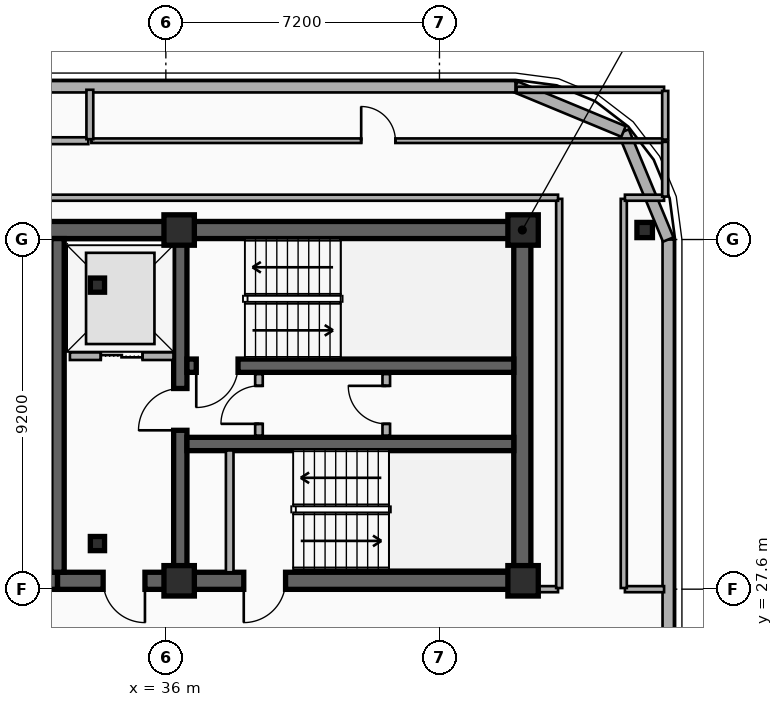
"""IFC4 building model, lengths in metres.
Left out: names, types, materials, properties, quantities, classifications, styles, units other than length and angle.
Written with IfcOpenShell. Run it as: python <this file> out.ifc"""

import sys

from ifc_helpers import new_model, si_unit, direction, frame, frame_2d, origin, origin_2d, place, context, subcontext, project, spatial, rectangle, i_section, extrude, element, fill, save


model = new_model("IFC4")
c1 = context("Model", 3, precision=1e-05, world=origin(), true_north=direction((0.0, 1.0)))
c2 = subcontext(c1, "Body", "Model", "MODEL_VIEW")
j1 = project(units=[si_unit("LENGTHUNIT", "METRE"), si_unit("PLANEANGLEUNIT", "RADIAN")], contexts=[c1])
p1 = place(None, origin())
s1 = spatial("IfcSite", under=j1, at=p1, CompositionType="ELEMENT")
p2 = place(p1, origin())
s2 = spatial("IfcBuilding", under=s1, at=p2, CompositionType="ELEMENT")
p3 = place(p2, frame((0.0, 0.0, 273.2)))
s3 = spatial("IfcBuildingStorey", under=s2, at=p3, CompositionType="ELEMENT", Elevation=273.2)
p4 = place(p3, frame((12.15, 37.05, 0.0), z_axis=(0.0, 0.0, 1.0), x_axis=(1.0, 0.0, 0.0)))
e1 = element("IfcWall", 1, at=p4, inside=s3, PredefinedType="SHEAR", context=c2, shape_type="SweptSolid", body=[
    extrude(rectangle(XDim=33.23, YDim=0.45, at=frame_2d((16.615, 0.0))), origin(), (0.0, 0.0, 1.0), 3.7),
])
p5 = place(p3, frame((33.15, 27.82, 0.0), z_axis=(0.0, 0.0, 1.0), x_axis=(-1.0, 0.0, 0.0)))
e2 = element("IfcWall", 2, at=p5, inside=s3, PredefinedType="SHEAR", context=c2, shape_type="SweptSolid", body=[
    extrude(rectangle(XDim=11.97, YDim=0.45, at=frame_2d((5.985, 0.0))), origin(), (0.0, 0.0, 1.0), 3.7),
])
p6 = place(p5, frame((6.1, 0.0, 0.0)))
e3 = element("IfcOpeningElement", 3, at=p6, cuts=e2, PredefinedType="OPENING", context=c2, shape_type="SweptSolid", body=[
    extrude(rectangle(XDim=1.6, YDim=2.2, at=frame_2d((0.8, 1.1))), frame((0.0, 0.235, 0.0), z_axis=(0.0, -1.0, 0.0), x_axis=(1.0, 0.0, 0.0)), (0.0, 0.0, 1.0), 0.47),
])
p7 = place(p3, frame((45.38, 27.82, 0.0), z_axis=(0.0, 0.0, 1.0), x_axis=(-1.0, 0.0, 0.0)))
e4 = element("IfcWall", 4, at=p7, inside=s3, PredefinedType="SHEAR", context=c2, shape_type="SweptSolid", body=[
    extrude(rectangle(XDim=12.23, YDim=0.45, at=frame_2d((6.115, 0.0))), origin(), (0.0, 0.0, 1.0), 3.7),
])
p8 = place(p7, frame((9.93, 0.0, 0.0)))
e5 = element("IfcOpeningElement", 5, at=p8, cuts=e4, PredefinedType="OPENING", context=c2, shape_type="SweptSolid", body=[
    extrude(rectangle(XDim=1.1, YDim=2.15, at=frame_2d((0.55, 1.075))), frame((0.0, 0.235, 0.0), z_axis=(0.0, -1.0, 0.0), x_axis=(1.0, 0.0, 0.0)), (0.0, 0.0, 1.0), 0.47),
])
p9 = place(p7, frame((6.23, 0.0, 0.0)))
e6 = element("IfcOpeningElement", 6, at=p9, cuts=e4, PredefinedType="OPENING", context=c2, shape_type="SweptSolid", body=[
    extrude(rectangle(XDim=1.1, YDim=2.15, at=frame_2d((0.55, 1.075))), frame((0.0, 0.235, 0.0), z_axis=(0.0, -1.0, 0.0), x_axis=(1.0, 0.0, 0.0)), (0.0, 0.0, 1.0), 0.47),
])
p10 = place(p3, frame((45.38, 28.045, 0.0), z_axis=(0.0, 0.0, 1.0), x_axis=(0.0, 1.0, 0.0)))
e7 = element("IfcWall", 7, at=p10, inside=s3, PredefinedType="SHEAR", context=c2, shape_type="SweptSolid", body=[
    extrude(rectangle(XDim=8.78, YDim=0.45, at=frame_2d((4.39, 0.0))), origin(), (0.0, 0.0, 1.0), 3.7),
])
p11 = place(p3, frame((33.15, 28.045, 0.0), z_axis=(0.0, 0.0, 1.0), x_axis=(0.0, 1.0, 0.0)))
e8 = element("IfcWall", 8, at=p11, inside=s3, PredefinedType="SHEAR", context=c2, shape_type="SweptSolid", body=[
    extrude(rectangle(XDim=8.78, YDim=0.35, at=frame_2d((4.39, 0.0))), origin(), (0.0, 0.0, 1.0), 3.7),
])
p12 = place(p3, frame((36.38, 28.045, 0.0), z_axis=(0.0, 0.0, 1.0), x_axis=(0.0, 1.0, 0.0)))
e9 = element("IfcWall", 9, at=p12, inside=s3, PredefinedType="SHEAR", context=c2, shape_type="SweptSolid", body=[
    extrude(rectangle(XDim=8.78, YDim=0.35, at=frame_2d((4.39, 0.0))), origin(), (0.0, 0.0, 1.0), 3.7),
])
p13 = place(p12, frame((3.735, 0.0, 0.0)))
e10 = element("IfcOpeningElement", 10, at=p13, cuts=e9, PredefinedType="OPENING", context=c2, shape_type="SweptSolid", body=[
    extrude(rectangle(XDim=1.1, YDim=2.15, at=frame_2d((0.55, 1.075))), frame((0.0, 0.185, 0.0), z_axis=(0.0, -1.0, 0.0), x_axis=(1.0, 0.0, 0.0)), (0.0, 0.0, 1.0), 0.37),
])
p14 = place(p3, frame((45.155, 33.48, 0.0), z_axis=(0.0, 0.0, 1.0), x_axis=(-1.0, 0.0, 0.0)))
e11 = element("IfcWall", 11, at=p14, inside=s3, PredefinedType="SHEAR", context=c2, shape_type="SweptSolid", body=[
    extrude(rectangle(XDim=8.6, YDim=0.35, at=frame_2d((4.3, 0.0))), origin(), (0.0, 0.0, 1.0), 3.7),
])
p15 = place(p14, frame((7.255, 0.0, 0.0)))
e12 = element("IfcOpeningElement", 12, at=p15, cuts=e11, PredefinedType="OPENING", context=c2, shape_type="SweptSolid", body=[
    extrude(rectangle(XDim=1.1, YDim=2.15, at=frame_2d((0.55, 1.075))), frame((0.0, 0.185, 0.0), z_axis=(0.0, -1.0, 0.0), x_axis=(1.0, 0.0, 0.0)), (0.0, 0.0, 1.0), 0.37),
])
p16 = place(p3, frame((36.555, 31.42, 0.0), z_axis=(0.0, 0.0, 1.0), x_axis=(1.0, 0.0, 0.0)))
e13 = element("IfcWall", 13, at=p16, inside=s3, PredefinedType="SHEAR", context=c2, shape_type="SweptSolid", body=[
    extrude(rectangle(XDim=8.6, YDim=0.35, at=frame_2d((4.3, 0.0))), origin(), (0.0, 0.0, 1.0), 3.7),
])
for number, where, z_axis, x_axis in (
    (14, (34.2, 28.8, 0.0), (0.0, 0.0, 1.0), (1.0, 0.0, 0.0)),
    (15, (34.2, 35.6, 0.0), (0.0, 0.0, 1.0), (1.0, 0.0, 0.0)),
):
    element("IfcColumn", number, at=place(p3, frame(where, z_axis=z_axis, x_axis=x_axis)), inside=s3, PredefinedType="COLUMN", context=c2, shape_type="SweptSolid", body=[
        extrude(i_section(OverallWidth=0.374, OverallDepth=0.372, WebThickness=0.017, FlangeThickness=0.027, FilletRadius=0.015, at=origin_2d()), origin(), (0.0, 0.0, 1.0), 3.7),
    ])
for number, where, z_axis, x_axis in (
    (16, (36.35, 27.82, 0.0), (0.0, 0.0, 1.0), (1.0, 0.0, 0.0)),
    (17, (36.35, 37.05, 0.0), (0.0, 0.0, 1.0), (1.0, 0.0, 0.0)),
    (18, (45.4, 27.82, 0.0), (0.0, 0.0, 1.0), (1.0, 0.0, 0.0)),
    (19, (45.4, 37.05, 0.0), (0.0, 0.0, 1.0), (1.0, 0.0, 0.0)),
):
    element("IfcColumn", number, at=place(p3, frame(where, z_axis=z_axis, x_axis=x_axis)), inside=s3, PredefinedType="COLUMN", context=c2, shape_type="SweptSolid", body=[
        extrude(rectangle(XDim=0.8, YDim=0.8, at=origin_2d()), origin(), (0.0, 0.0, 1.0), 3.7),
    ])
p17 = place(p3, frame((48.6, 37.05, 0.0), z_axis=(0.0, 0.0, 1.0), x_axis=(1.0, 0.0, 0.0)))
e20 = element("IfcColumn", 20, at=p17, inside=s3, PredefinedType="COLUMN", context=c2, shape_type="SweptSolid", body=[
    extrude(i_section(OverallWidth=0.408, OverallDepth=0.4, WebThickness=0.025, FlangeThickness=0.039, FilletRadius=0.015, at=origin_2d()), origin(), (0.0, 0.0, 1.0), 3.7),
])
p18 = place(p3, frame((49.22, 36.8, 0.0), z_axis=(0.0, 0.0, 1.0), x_axis=(0.0, -1.0, 0.0)))
e21 = element("IfcWall", 21, at=p18, inside=s3, PredefinedType="SOLIDWALL", context=c2, shape_type="SweptSolid", body=[
    extrude(rectangle(XDim=34.2, YDim=0.3, at=frame_2d((17.1, 0.0))), origin(), (0.0, 0.0, 1.0), 3.42),
])
p19 = place(p18, frame((21.127, 0.0, 0.75)))
e22 = element("IfcOpeningElement", 22, at=p19, cuts=e21, PredefinedType="OPENING", context=c2, shape_type="SweptSolid", body=[
    extrude(rectangle(XDim=2.1, YDim=2.1, at=frame_2d((1.05, 1.05))), frame((0.0, 0.16, 0.0), z_axis=(0.0, -1.0, 0.0), x_axis=(1.0, 0.0, 0.0)), (0.0, 0.0, 1.0), 0.32),
])
p20 = place(p18, frame((27.503, 0.0, 0.75)))
e23 = element("IfcOpeningElement", 23, at=p20, cuts=e21, PredefinedType="OPENING", context=c2, shape_type="SweptSolid", body=[
    extrude(rectangle(XDim=2.1, YDim=2.1, at=frame_2d((1.05, 1.05))), frame((0.0, 0.16, 0.0), z_axis=(0.0, -1.0, 0.0), x_axis=(1.0, 0.0, 0.0)), (0.0, 0.0, 1.0), 0.32),
])
for number, where, z_axis, x_axis in (
    (24, (48.042, 39.643, 0.0), (0.0, 0.0, 1.0), (0.383, -0.924, 0.0)),
    (25, (45.2, 40.82, 0.0), (0.0, 0.0, 1.0), (0.924, -0.383, 0.0)),
):
    element("IfcWall", number, at=place(p3, frame(where, z_axis=z_axis, x_axis=x_axis)), inside=s3, PredefinedType="SOLIDWALL", context=c2, shape_type="SweptSolid", body=[
        extrude(rectangle(XDim=3.077, YDim=0.3, at=frame_2d((1.538, 0.0))), origin(), (0.0, 0.0, 1.0), 3.42),
    ])
p21 = place(p3, frame((12.4, 40.82, 0.0), z_axis=(0.0, 0.0, 1.0), x_axis=(1.0, 0.0, 0.0)))
e26 = element("IfcWall", 26, at=p21, inside=s3, PredefinedType="SOLIDWALL", context=c2, shape_type="SweptSolid", body=[
    extrude(rectangle(XDim=32.8, YDim=0.3, at=frame_2d((16.4, 0.0))), origin(), (0.0, 0.0, 1.0), 3.42),
])
p22 = place(p21, frame((3.38, 0.0, 0.75)))
e27 = element("IfcOpeningElement", 27, at=p22, cuts=e26, PredefinedType="OPENING", context=c2, shape_type="SweptSolid", body=[
    extrude(rectangle(XDim=2.1, YDim=2.1, at=frame_2d((1.05, 1.05))), frame((0.0, 0.16, 0.0), z_axis=(0.0, -1.0, 0.0), x_axis=(1.0, 0.0, 0.0)), (0.0, 0.0, 1.0), 0.32),
])
p23 = place(p21, frame((8.54, 0.0, 0.75)))
e28 = element("IfcOpeningElement", 28, at=p23, cuts=e26, PredefinedType="OPENING", context=c2, shape_type="SweptSolid", body=[
    extrude(rectangle(XDim=2.1, YDim=2.1, at=frame_2d((1.05, 1.05))), frame((0.0, 0.16, 0.0), z_axis=(0.0, -1.0, 0.0), x_axis=(1.0, 0.0, 0.0)), (0.0, 0.0, 1.0), 0.32),
])
p24 = place(p3, frame((33.475, 33.73, 0.0), z_axis=(0.0, 0.0, 1.0), x_axis=(1.0, 0.0, 0.0)))
e29 = element("IfcWall", 29, at=p24, inside=s3, PredefinedType="PARTITIONING", context=c2, shape_type="SweptSolid", body=[
    extrude(rectangle(XDim=2.725, YDim=0.2, at=frame_2d((1.362, 0.0))), origin(), (0.0, 0.0, 1.0), 2.49),
])
p25 = place(p24, frame((0.812, 0.0, 0.0)))
e30 = element("IfcOpeningElement", 30, at=p25, cuts=e29, PredefinedType="OPENING", context=c2, shape_type="SweptSolid", body=[
    extrude(rectangle(XDim=1.1, YDim=2.15, at=frame_2d((0.55, 1.075))), frame((0.0, 0.11, 0.0), z_axis=(0.0, -1.0, 0.0), x_axis=(1.0, 0.0, 0.0)), (0.0, 0.0, 1.0), 0.22),
])
p26 = place(p3, frame((37.68, 28.045, 0.0), z_axis=(0.0, 0.0, 1.0), x_axis=(0.0, 1.0, 0.0)))
e31 = element("IfcWall", 31, at=p26, inside=s3, PredefinedType="PARTITIONING", context=c2, shape_type="SweptSolid", body=[
    extrude(rectangle(XDim=3.205, YDim=0.2, at=frame_2d((1.603, 0.0))), origin(), (0.0, 0.0, 1.0), 2.8),
])
p27 = place(p3, frame((38.45, 31.64, 0.0), z_axis=(0.0, 0.0, 1.0), x_axis=(0.0, 1.0, 0.0)))
e32 = element("IfcWall", 32, at=p27, inside=s3, PredefinedType="PARTITIONING", context=c2, shape_type="SweptSolid", body=[
    extrude(rectangle(XDim=1.62, YDim=0.2, at=frame_2d((0.81, 0.0))), origin(), (0.0, 0.0, 1.0), 3.42),
])
p28 = place(p27, frame((0.31, 0.0, 0.0)))
e33 = element("IfcOpeningElement", 33, at=p28, cuts=e32, PredefinedType="OPENING", context=c2, shape_type="SweptSolid", body=[
    extrude(rectangle(XDim=1.0, YDim=2.15, at=frame_2d((0.5, 1.075))), frame((0.0, 0.11, 0.0), z_axis=(0.0, -1.0, 0.0), x_axis=(1.0, 0.0, 0.0)), (0.0, 0.0, 1.0), 0.22),
])
p29 = place(p3, frame((41.8, 31.64, 0.0), z_axis=(0.0, 0.0, 1.0), x_axis=(0.0, 1.0, 0.0)))
e34 = element("IfcWall", 34, at=p29, inside=s3, PredefinedType="PARTITIONING", context=c2, shape_type="SweptSolid", body=[
    extrude(rectangle(XDim=1.62, YDim=0.2, at=frame_2d((0.81, 0.0))), origin(), (0.0, 0.0, 1.0), 3.42),
])
p30 = place(p29, frame((0.31, 0.0, 0.0)))
e35 = element("IfcOpeningElement", 35, at=p30, cuts=e34, PredefinedType="OPENING", context=c2, shape_type="SweptSolid", body=[
    extrude(rectangle(XDim=1.0, YDim=2.15, at=frame_2d((0.5, 1.075))), frame((0.0, 0.11, 0.0), z_axis=(0.0, -1.0, 0.0), x_axis=(1.0, 0.0, 0.0)), (0.0, 0.0, 1.0), 0.22),
])
p31 = place(p3, frame((26.44, 39.4, 0.0), z_axis=(0.0, 0.0, 1.0), x_axis=(1.0, 0.0, 0.0)))
e36 = element("IfcWall", 36, at=p31, inside=s3, PredefinedType="PLUMBINGWALL", context=c2, shape_type="SweptSolid", body=[
    extrude(rectangle(XDim=7.52, YDim=0.18, at=frame_2d((3.76, 0.0))), origin(), (0.0, 0.0, 1.0), 3.42),
])
p32 = place(p31, frame((3.335, 0.0, 0.0)))
e37 = element("IfcOpeningElement", 37, at=p32, cuts=e36, PredefinedType="OPENING", context=c2, shape_type="SweptSolid", body=[
    extrude(rectangle(XDim=0.85, YDim=2.1, at=frame_2d((0.425, 1.05))), frame((0.0, 0.1, 0.0), z_axis=(0.0, -1.0, 0.0), x_axis=(1.0, 0.0, 0.0)), (0.0, 0.0, 1.0), 0.2),
])
p33 = place(p3, frame((34.04, 39.4, 0.0), z_axis=(0.0, 0.0, 1.0), x_axis=(1.0, 0.0, 0.0)))
e38 = element("IfcWall", 38, at=p33, inside=s3, PredefinedType="PARTITIONING", context=c2, shape_type="SweptSolid", body=[
    extrude(rectangle(XDim=15.1, YDim=0.12, at=frame_2d((7.55, 0.0))), origin(), (0.0, 0.0, 1.0), 3.42),
])
p34 = place(p33, frame((7.1, 0.0, 0.0)))
e39 = element("IfcOpeningElement", 39, at=p34, cuts=e38, PredefinedType="OPENING", context=c2, shape_type="SweptSolid", body=[
    extrude(rectangle(XDim=0.9, YDim=2.1, at=frame_2d((0.45, 1.05))), frame((0.0, 0.07, 0.0), z_axis=(0.0, -1.0, 0.0), x_axis=(1.0, 0.0, 0.0)), (0.0, 0.0, 1.0), 0.14),
])
p35 = place(p3, frame((34.0, 39.44, 0.0), z_axis=(0.0, 0.0, 1.0), x_axis=(0.0, 1.0, 0.0)))
e40 = element("IfcWall", 40, at=p35, inside=s3, PredefinedType="PLUMBINGWALL", context=c2, shape_type="SweptSolid", body=[
    extrude(rectangle(XDim=1.3, YDim=0.18, at=frame_2d((0.65, 0.0))), origin(), (0.0, 0.0, 1.0), 3.42),
])
p36 = place(p3, frame((45.41, 27.6, 0.0), z_axis=(0.0, 0.0, 1.0), x_axis=(1.0, 0.0, 0.0)))
e41 = element("IfcWall", 41, at=p36, inside=s3, PredefinedType="PARTITIONING", context=c2, shape_type="SweptSolid", body=[
    extrude(rectangle(XDim=0.91, YDim=0.16, at=frame_2d((0.455, 0.0))), origin(), (0.0, 0.0, 1.0), 2.49),
])
p37 = place(p3, frame((48.08, 27.6, 0.0), z_axis=(0.0, 0.0, 1.0), x_axis=(1.0, 0.0, 0.0)))
e42 = element("IfcWall", 42, at=p37, inside=s3, PredefinedType="PARTITIONING", context=c2, shape_type="SweptSolid", body=[
    extrude(rectangle(XDim=1.03, YDim=0.16, at=frame_2d((0.515, 0.0))), origin(), (0.0, 0.0, 1.0), 3.42),
])
for number, where, z_axis, x_axis in (
    (43, (46.35, 27.63, 0.0), (0.0, 0.0, 1.0), (0.0, 1.0, 0.0)),
    (44, (48.05, 27.63, 0.0), (0.0, 0.0, 1.0), (0.0, 1.0, 0.0)),
):
    element("IfcWall", number, at=place(p3, frame(where, z_axis=z_axis, x_axis=x_axis)), inside=s3, PredefinedType="PARTITIONING", context=c2, shape_type="SweptSolid", body=[
        extrude(rectangle(XDim=10.24, YDim=0.16, at=frame_2d((5.12, 0.0))), origin(), (0.0, 0.0, 1.0), 2.9),
    ])
p38 = place(p3, frame((11.28, 37.9, 0.0), z_axis=(0.0, 0.0, 1.0), x_axis=(1.0, 0.0, 0.0)))
e45 = element("IfcWall", 45, at=p38, inside=s3, PredefinedType="PARTITIONING", context=c2, shape_type="SweptSolid", body=[
    extrude(rectangle(XDim=35.04, YDim=0.16, at=frame_2d((17.52, 0.0))), origin(), (0.0, 0.0, 1.0), 3.42),
])
p39 = place(p3, frame((48.08, 37.9, 0.0), z_axis=(0.0, 0.0, 1.0), x_axis=(1.0, 0.0, 0.0)))
e46 = element("IfcWall", 46, at=p39, inside=s3, PredefinedType="PARTITIONING", context=c2, shape_type="SweptSolid", body=[
    extrude(rectangle(XDim=1.03, YDim=0.16, at=frame_2d((0.515, 0.0))), origin(), (0.0, 0.0, 1.0), 3.42),
])
p40 = place(p3, frame((49.14, 37.93, 0.0), z_axis=(0.0, 0.0, 1.0), x_axis=(0.0, 1.0, 0.0)))
e47 = element("IfcWall", 47, at=p40, inside=s3, PredefinedType="PARTITIONING", context=c2, shape_type="SweptSolid", body=[
    extrude(rectangle(XDim=1.44, YDim=0.16, at=frame_2d((0.72, 0.0))), origin(), (0.0, 0.0, 1.0), 3.42),
])
p41 = place(p3, frame((45.23, 40.74, 0.0), z_axis=(0.0, 0.0, 1.0), x_axis=(1.0, 0.0, 0.0)))
e48 = element("IfcWall", 48, at=p41, inside=s3, PredefinedType="PARTITIONING", context=c2, shape_type="SweptSolid", body=[
    extrude(rectangle(XDim=3.88, YDim=0.16, at=frame_2d((1.94, 0.0))), origin(), (0.0, 0.0, 1.0), 3.42),
])
p42 = place(p3, frame((49.14, 39.43, 0.0), z_axis=(0.0, 0.0, 1.0), x_axis=(0.0, 1.0, 0.0)))
e49 = element("IfcWall", 49, at=p42, inside=s3, PredefinedType="PARTITIONING", context=c2, shape_type="SweptSolid", body=[
    extrude(rectangle(XDim=1.28, YDim=0.16, at=frame_2d((0.64, 0.0))), origin(), (0.0, 0.0, 1.0), 3.42),
])
p43 = place(p25, origin())
e50 = element("IfcDoor", 50, at=p43, inside=s3, OperationType="DOUBLE_DOOR_SLIDING", PredefinedType="DOOR", context=c2, shape_type="SweptSolid", body=[
    extrude(rectangle(XDim=1.1, YDim=2.15, at=frame_2d((0.55, 1.075))), frame((0.0, 0.025, 0.0), z_axis=(0.0, -1.0, 0.0), x_axis=(1.0, 0.0, 0.0)), (0.0, 0.0, 1.0), 0.05),
])
fill(e30, e50)
p44 = place(p15, origin())
e51 = element("IfcDoor", 51, at=p44, inside=s3, OperationType="SINGLE_SWING_RIGHT", PredefinedType="DOOR", context=c2, shape_type="SweptSolid", body=[
    extrude(rectangle(XDim=1.1, YDim=2.15, at=frame_2d((0.55, 1.075))), frame((0.0, 0.025, 0.0), z_axis=(0.0, -1.0, 0.0), x_axis=(1.0, 0.0, 0.0)), (0.0, 0.0, 1.0), 0.05),
])
fill(e12, e51)
p45 = place(p13, origin())
e52 = element("IfcDoor", 52, at=p45, inside=s3, OperationType="SINGLE_SWING_LEFT", PredefinedType="DOOR", context=c2, shape_type="SweptSolid", body=[
    extrude(rectangle(XDim=1.1, YDim=2.15, at=frame_2d((0.55, 1.075))), frame((0.0, 0.025, 0.0), z_axis=(0.0, -1.0, 0.0), x_axis=(1.0, 0.0, 0.0)), (0.0, 0.0, 1.0), 0.05),
])
fill(e10, e52)
p46 = place(p8, origin())
e53 = element("IfcDoor", 53, at=p46, inside=s3, OperationType="SINGLE_SWING_LEFT", PredefinedType="DOOR", context=c2, shape_type="SweptSolid", body=[
    extrude(rectangle(XDim=1.1, YDim=2.15, at=frame_2d((0.55, 1.075))), frame((0.0, 0.025, 0.0), z_axis=(0.0, -1.0, 0.0), x_axis=(1.0, 0.0, 0.0)), (0.0, 0.0, 1.0), 0.05),
])
fill(e5, e53)
p47 = place(p9, origin())
e54 = element("IfcDoor", 54, at=p47, inside=s3, OperationType="SINGLE_SWING_RIGHT", PredefinedType="DOOR", context=c2, shape_type="SweptSolid", body=[
    extrude(rectangle(XDim=1.1, YDim=2.15, at=frame_2d((0.55, 1.075))), frame((0.0, 0.025, 0.0), z_axis=(0.0, -1.0, 0.0), x_axis=(1.0, 0.0, 0.0)), (0.0, 0.0, 1.0), 0.05),
])
fill(e6, e54)
p48 = place(p28, origin())
e55 = element("IfcDoor", 55, at=p48, inside=s3, OperationType="SINGLE_SWING_LEFT", PredefinedType="DOOR", context=c2, shape_type="SweptSolid", body=[
    extrude(rectangle(XDim=1.0, YDim=2.15, at=frame_2d((0.5, 1.075))), frame((0.0, 0.025, 0.0), z_axis=(0.0, -1.0, 0.0), x_axis=(1.0, 0.0, 0.0)), (0.0, 0.0, 1.0), 0.05),
])
fill(e33, e55)
p49 = place(p30, origin())
e56 = element("IfcDoor", 56, at=p49, inside=s3, OperationType="SINGLE_SWING_RIGHT", PredefinedType="DOOR", context=c2, shape_type="SweptSolid", body=[
    extrude(rectangle(XDim=1.0, YDim=2.15, at=frame_2d((0.5, 1.075))), frame((0.0, 0.025, 0.0), z_axis=(0.0, -1.0, 0.0), x_axis=(1.0, 0.0, 0.0)), (0.0, 0.0, 1.0), 0.05),
])
fill(e35, e56)
p50 = place(p34, origin())
e57 = element("IfcDoor", 57, at=p50, inside=s3, OperationType="SINGLE_SWING_LEFT", PredefinedType="DOOR", context=c2, shape_type="SweptSolid", body=[
    extrude(rectangle(XDim=0.9, YDim=2.1, at=frame_2d((0.45, 1.05))), frame((0.0, 0.025, 0.0), z_axis=(0.0, -1.0, 0.0), x_axis=(1.0, 0.0, 0.0)), (0.0, 0.0, 1.0), 0.05),
])
fill(e39, e57)
save(model, sys.argv[1])
